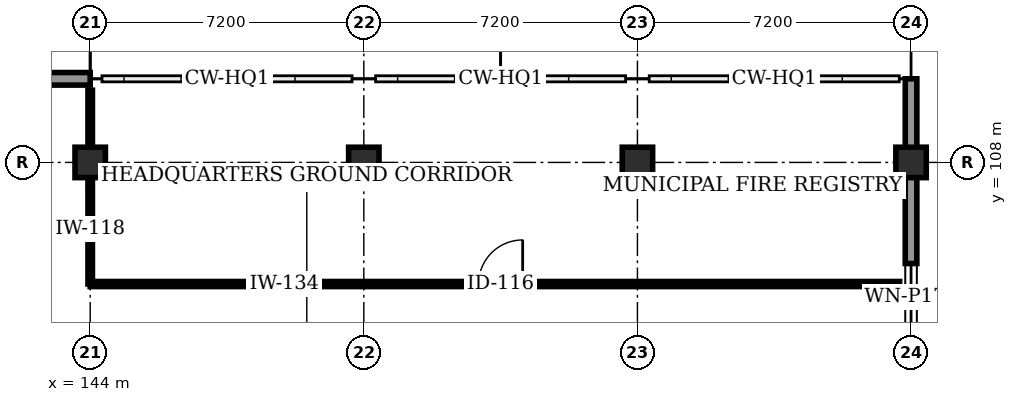
"""IFC4 building model, lengths in metres.
Left out: names, types, materials, properties, quantities, classifications, styles, units other than length and angle.
Written with IfcOpenShell. Run it as: python <this file> out.ifc"""

import sys

from ifc_helpers import new_model, si_unit, direction, frame, frame_2d, origin, origin_2d, place, context, subcontext, project, spatial, rectangle, extrude, element, fill, save


model = new_model("IFC4")
c1 = context("Model", 3, precision=1e-05, world=origin(), true_north=direction((0.0, 1.0)))
c2 = subcontext(c1, "Body", "Model", "MODEL_VIEW")
j1 = project(units=[si_unit("LENGTHUNIT", "METRE"), si_unit("PLANEANGLEUNIT", "RADIAN")], contexts=[c1])
p1 = place(None, origin())
s1 = spatial("IfcSite", under=j1, at=p1, CompositionType="ELEMENT")
p2 = place(p1, origin())
s2 = spatial("IfcBuilding", under=s1, at=p2, CompositionType="ELEMENT")
p3 = place(p2, origin())
s3 = spatial("IfcBuildingStorey", under=s2, at=p3, CompositionType="ELEMENT", Elevation=0.0)
for number, where, z_axis, x_axis in (
    (1, (144.0, 108.0, 0.0), (0.0, 0.0, 1.0), (1.0, 0.0, 0.0)),
    (2, (151.2, 108.0, 0.0), (0.0, 0.0, 1.0), (1.0, 0.0, 0.0)),
    (3, (158.4, 108.0, 0.0), (0.0, 0.0, 1.0), (1.0, 0.0, 0.0)),
    (4, (165.6, 108.0, 0.0), (0.0, 0.0, 1.0), (1.0, 0.0, 0.0)),
):
    element("IfcColumn", number, at=place(p3, frame(where, z_axis=z_axis, x_axis=x_axis)), inside=s3, PredefinedType="COLUMN", context=c2, shape_type="SweptSolid", body=[
        extrude(rectangle(XDim=0.8, YDim=0.8, at=origin_2d()), origin(), (0.0, 0.0, 1.0), 6.0),
    ])
p4 = place(p3, frame((136.8, 110.2, 0.0), z_axis=(0.0, 0.0, 1.0), x_axis=(1.0, 0.0, 0.0)))
e5 = element("IfcWall", 5, at=p4, inside=s3, PredefinedType="STANDARD", context=c2, shape_type="SweptSolid", body=[
    extrude(rectangle(XDim=7.2, YDim=0.33, at=frame_2d((3.6, 0.0))), origin(), (0.0, 0.0, 1.0), 5.05),
])
p5 = place(p4, frame((2.63, 0.0, 0.0)))
e6 = element("IfcOpeningElement", 6, at=p5, cuts=e5, PredefinedType="OPENING", context=c2, shape_type="SweptSolid", body=[
    extrude(rectangle(XDim=1.94, YDim=2.38, at=frame_2d((0.97, 1.19))), frame((0.0, 0.175, 0.0), z_axis=(0.0, -1.0, 0.0), x_axis=(1.0, 0.0, 0.0)), (0.0, 0.0, 1.0), 0.35),
])
p6 = place(p3, frame((165.6, 93.6, 0.0), z_axis=(0.0, 0.0, 1.0), x_axis=(0.0, 1.0, 0.0)))
e7 = element("IfcWall", 7, at=p6, inside=s3, PredefinedType="STANDARD", context=c2, shape_type="SweptSolid", body=[
    extrude(rectangle(XDim=16.6, YDim=0.305, at=frame_2d((8.3, 0.0))), origin(), (0.0, 0.0, 1.0), 5.05),
])
p7 = place(p6, frame((2.7, 0.0, 1.2)))
e8 = element("IfcOpeningElement", 8, at=p7, cuts=e7, PredefinedType="OPENING", context=c2, shape_type="SweptSolid", body=[
    extrude(rectangle(XDim=1.86, YDim=1.68, at=frame_2d((0.93, 0.84))), frame((0.0, 0.162, 0.0), z_axis=(0.0, -1.0, 0.0), x_axis=(1.0, 0.0, 0.0)), (0.0, 0.0, 1.0), 0.325),
])
p8 = place(p6, frame((10.0, 0.0, 1.2)))
e9 = element("IfcOpeningElement", 9, at=p8, cuts=e7, PredefinedType="OPENING", context=c2, shape_type="SweptSolid", body=[
    extrude(rectangle(XDim=1.74, YDim=1.64, at=frame_2d((0.87, 0.82))), frame((0.0, 0.162, 0.0), z_axis=(0.0, -1.0, 0.0), x_axis=(1.0, 0.0, 0.0)), (0.0, 0.0, 1.0), 0.325),
])
p9 = place(p3, frame((144.0, 104.8, 0.0), z_axis=(0.0, 0.0, 1.0), x_axis=(1.0, 0.0, 0.0)))
e10 = element("IfcWall", 10, at=p9, inside=s3, PredefinedType="STANDARD", context=c2, shape_type="SweptSolid", body=[
    extrude(rectangle(XDim=21.3, YDim=0.134, at=frame_2d((10.65, 0.0))), origin(), (0.0, 0.0, 1.0), 5.103),
])
p10 = place(p9, frame((10.22, 0.0, 0.0)))
e11 = element("IfcOpeningElement", 11, at=p10, cuts=e10, PredefinedType="OPENING", context=c2, shape_type="SweptSolid", body=[
    extrude(rectangle(XDim=1.16, YDim=2.22, at=frame_2d((0.58, 1.11))), frame((0.0, 0.077, 0.0), z_axis=(0.0, -1.0, 0.0), x_axis=(1.0, 0.0, 0.0)), (0.0, 0.0, 1.0), 0.154),
])
p11 = place(p3, frame((144.0, 109.9, 0.0), z_axis=(0.0, 0.0, 1.0), x_axis=(0.0, -1.0, 0.0)))
e12 = element("IfcWall", 12, at=p11, inside=s3, PredefinedType="STANDARD", context=c2, shape_type="SweptSolid", body=[
    extrude(rectangle(XDim=5.1, YDim=0.118, at=frame_2d((2.55, 0.0))), origin(), (0.0, 0.0, 1.0), 5.022),
])
p12 = place(p8, origin())
e13 = element("IfcWindow", 13, at=p12, inside=s3, PartitioningType="SINGLE_PANEL", PredefinedType="WINDOW", context=c2, shape_type="SweptSolid", body=[
    extrude(rectangle(XDim=1.74, YDim=1.64, at=frame_2d((0.87, 0.82))), frame((0.0, 0.03, 0.0), z_axis=(0.0, -1.0, 0.0), x_axis=(1.0, 0.0, 0.0)), (0.0, 0.0, 1.0), 0.06),
])
fill(e9, e13)
p13 = place(p10, origin())
e14 = element("IfcDoor", 14, at=p13, inside=s3, OperationType="SINGLE_SWING_RIGHT", PredefinedType="DOOR", context=c2, shape_type="SweptSolid", body=[
    extrude(rectangle(XDim=1.16, YDim=2.22, at=frame_2d((0.58, 1.11))), frame((0.0, 0.025, 0.0), z_axis=(0.0, -1.0, 0.0), x_axis=(1.0, 0.0, 0.0)), (0.0, 0.0, 1.0), 0.05),
])
fill(e11, e14)
save(model, sys.argv[1])
